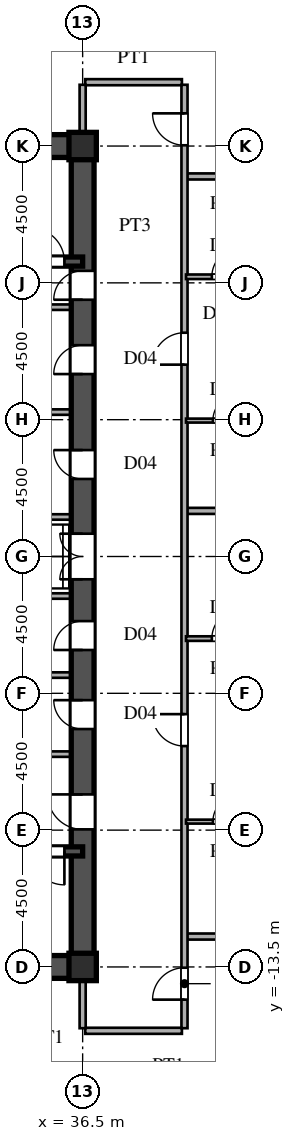
"""IFC4 building model, lengths in metres.
Left out: names, types, materials, properties, quantities, classifications, styles, units other than length and angle.
Written with IfcOpenShell. Run it as: python <this file> out.ifc"""

import sys

from ifc_helpers import new_model, si_unit, direction, frame, frame_2d, origin, origin_2d, place, context, subcontext, project, spatial, rectangle, i_section, extrude, source, transform, mapped, element, fill, save


model = new_model("IFC4")
c1 = context("Model", 3, precision=1e-05, world=origin(), true_north=direction((0.0, 1.0)))
c2 = subcontext(c1, "Body", "Model", "MODEL_VIEW")
j1 = project(units=[si_unit("LENGTHUNIT", "METRE"), si_unit("PLANEANGLEUNIT", "RADIAN")], contexts=[c1])
p1 = place(None, origin())
s1 = spatial("IfcSite", under=j1, at=p1, CompositionType="ELEMENT")
p2 = place(p1, origin())
s2 = spatial("IfcBuilding", under=s1, at=p2, CompositionType="ELEMENT")
p3 = place(p2, frame((0.0, 0.0, 47.7)))
s3 = spatial("IfcBuildingStorey", under=s2, at=p3, CompositionType="ELEMENT", Elevation=47.7)
m1 = source(origin(), c2, "Body", "SweptSolid", [
    extrude(i_section(OverallWidth=0.9, OverallDepth=0.9, WebThickness=0.036, FlangeThickness=0.055, at=origin_2d()), origin(), (0.0, 0.0, 1.0), 3.6),
])
for number, where, z_axis, x_axis in (
    (1, (36.5, -13.5, 0.0), (0.0, 0.0, 1.0), (1.0, 0.0, 0.0)),
    (2, (36.5, 13.5, 0.0), (0.0, 0.0, 1.0), (1.0, 0.0, 0.0)),
):
    element("IfcColumn", number, at=place(p3, frame(where, z_axis=z_axis, x_axis=x_axis)), inside=s3, PredefinedType="COLUMN", context=c2, shape_type="MappedRepresentation", body=[
        mapped(m1, transform((0.0, 0.0, 0.0), scale=1.0)),
    ])
for number, where, z_axis, x_axis in (
    (3, (27.5, -13.5, 0.0), (0.0, 0.0, 1.0), (1.0, 0.0, 0.0)),
    (4, (27.5, 13.5, 0.0), (0.0, 0.0, 1.0), (1.0, 0.0, 0.0)),
):
    element("IfcWall", number, at=place(p3, frame(where, z_axis=z_axis, x_axis=x_axis)), inside=s3, PredefinedType="SHEAR", context=c2, shape_type="SweptSolid", body=[
        extrude(rectangle(XDim=9.0, YDim=0.75, at=frame_2d((4.5, 0.0))), origin(), (0.0, 0.0, 1.0), 3.38),
    ])
p4 = place(p3, frame((36.5, -13.65, 0.0), z_axis=(0.0, 0.0, 1.0), x_axis=(0.0, 1.0, 0.0)))
e5 = element("IfcWall", 5, at=p4, inside=s3, PredefinedType="SHEAR", context=c2, shape_type="SweptSolid", body=[
    extrude(rectangle(XDim=7.15, YDim=0.75, at=frame_2d((3.575, 0.0))), origin(), (0.0, 0.0, 1.0), 3.38),
])
p5 = place(p4, frame((4.675, 0.0, 0.0)))
e6 = element("IfcOpeningElement", 6, at=p5, cuts=e5, PredefinedType="OPENING", context=c2, shape_type="SweptSolid", body=[
    extrude(rectangle(XDim=1.15, YDim=2.2, at=frame_2d((0.575, 1.1))), frame((0.0, 0.385, 0.0), z_axis=(0.0, -1.0, 0.0), x_axis=(1.0, 0.0, 0.0)), (0.0, 0.0, 1.0), 0.77),
])
p6 = place(p3, frame((36.5, -1.3, 0.0), z_axis=(0.0, 0.0, 1.0), x_axis=(0.0, 1.0, 0.0)))
e7 = element("IfcWall", 7, at=p6, inside=s3, PredefinedType="SHEAR", context=c2, shape_type="SweptSolid", body=[
    extrude(rectangle(XDim=2.6, YDim=0.75, at=frame_2d((1.3, 0.0))), origin(), (0.0, 0.0, 1.0), 3.38),
])
p7 = place(p6, frame((0.55, 0.0, 0.0)))
e8 = element("IfcOpeningElement", 8, at=p7, cuts=e7, PredefinedType="OPENING", context=c2, shape_type="SweptSolid", body=[
    extrude(rectangle(XDim=1.5, YDim=2.3, at=frame_2d((0.75, 1.15))), frame((0.0, 0.385, 0.0), z_axis=(0.0, -1.0, 0.0), x_axis=(1.0, 0.0, 0.0)), (0.0, 0.0, 1.0), 0.77),
])
p8 = place(p3, frame((36.5, 8.2, 0.0), z_axis=(0.0, 0.0, 1.0), x_axis=(0.0, 1.0, 0.0)))
e9 = element("IfcWall", 9, at=p8, inside=s3, PredefinedType="SHEAR", context=c2, shape_type="SweptSolid", body=[
    extrude(rectangle(XDim=5.45, YDim=0.75, at=frame_2d((2.725, 0.0))), origin(), (0.0, 0.0, 1.0), 3.38),
])
p9 = place(p8, frame((0.245, 0.0, 0.0)))
e10 = element("IfcOpeningElement", 10, at=p9, cuts=e9, PredefinedType="OPENING", context=c2, shape_type="SweptSolid", body=[
    extrude(rectangle(XDim=0.95, YDim=2.15, at=frame_2d((0.475, 1.075))), frame((0.0, 0.385, 0.0), z_axis=(0.0, -1.0, 0.0), x_axis=(1.0, 0.0, 0.0)), (0.0, 0.0, 1.0), 0.77),
])
p10 = place(p3, frame((36.5, -6.5, 0.0), z_axis=(0.0, 0.0, 1.0), x_axis=(0.0, 1.0, 0.0)))
e11 = element("IfcWall", 11, at=p10, inside=s3, PredefinedType="SHEAR", context=c2, shape_type="SweptSolid", body=[
    extrude(rectangle(XDim=2.6, YDim=0.75, at=frame_2d((1.3, 0.0))), origin(), (0.0, 0.0, 1.0), 3.38),
])
p11 = place(p10, frame((0.825, 0.0, 0.0)))
e12 = element("IfcOpeningElement", 12, at=p11, cuts=e11, PredefinedType="OPENING", context=c2, shape_type="SweptSolid", body=[
    extrude(rectangle(XDim=0.95, YDim=2.15, at=frame_2d((0.475, 1.075))), frame((0.0, 0.385, 0.0), z_axis=(0.0, -1.0, 0.0), x_axis=(1.0, 0.0, 0.0)), (0.0, 0.0, 1.0), 0.77),
])
p12 = place(p3, frame((36.5, -3.9, 0.0), z_axis=(0.0, 0.0, 1.0), x_axis=(0.0, 1.0, 0.0)))
e13 = element("IfcWall", 13, at=p12, inside=s3, PredefinedType="SHEAR", context=c2, shape_type="SweptSolid", body=[
    extrude(rectangle(XDim=2.6, YDim=0.75, at=frame_2d((1.3, 0.0))), origin(), (0.0, 0.0, 1.0), 3.38),
])
p13 = place(p12, frame((0.825, 0.0, 0.0)))
e14 = element("IfcOpeningElement", 14, at=p13, cuts=e13, PredefinedType="OPENING", context=c2, shape_type="SweptSolid", body=[
    extrude(rectangle(XDim=0.95, YDim=2.15, at=frame_2d((0.475, 1.075))), frame((0.0, 0.385, 0.0), z_axis=(0.0, -1.0, 0.0), x_axis=(1.0, 0.0, 0.0)), (0.0, 0.0, 1.0), 0.77),
])
p14 = place(p3, frame((36.5, 1.3, 0.0), z_axis=(0.0, 0.0, 1.0), x_axis=(0.0, 1.0, 0.0)))
e15 = element("IfcWall", 15, at=p14, inside=s3, PredefinedType="SHEAR", context=c2, shape_type="SweptSolid", body=[
    extrude(rectangle(XDim=3.45, YDim=0.75, at=frame_2d((1.725, 0.0))), origin(), (0.0, 0.0, 1.0), 3.38),
])
p15 = place(p14, frame((1.25, 0.0, 0.0)))
e16 = element("IfcOpeningElement", 16, at=p15, cuts=e15, PredefinedType="OPENING", context=c2, shape_type="SweptSolid", body=[
    extrude(rectangle(XDim=0.95, YDim=2.15, at=frame_2d((0.475, 1.075))), frame((0.0, 0.385, 0.0), z_axis=(0.0, -1.0, 0.0), x_axis=(1.0, 0.0, 0.0)), (0.0, 0.0, 1.0), 0.77),
])
p16 = place(p3, frame((36.5, 4.75, 0.0), z_axis=(0.0, 0.0, 1.0), x_axis=(0.0, 1.0, 0.0)))
e17 = element("IfcWall", 17, at=p16, inside=s3, PredefinedType="SHEAR", context=c2, shape_type="SweptSolid", body=[
    extrude(rectangle(XDim=3.45, YDim=0.75, at=frame_2d((1.725, 0.0))), origin(), (0.0, 0.0, 1.0), 3.38),
])
p17 = place(p16, frame((1.25, 0.0, 0.0)))
e18 = element("IfcOpeningElement", 18, at=p17, cuts=e17, PredefinedType="OPENING", context=c2, shape_type="SweptSolid", body=[
    extrude(rectangle(XDim=0.95, YDim=2.15, at=frame_2d((0.475, 1.075))), frame((0.0, 0.385, 0.0), z_axis=(0.0, -1.0, 0.0), x_axis=(1.0, 0.0, 0.0)), (0.0, 0.0, 1.0), 0.77),
])
p18 = place(p3, frame((27.5, -9.7, 0.0), z_axis=(0.0, 0.0, 1.0), x_axis=(1.0, 0.0, 0.0)))
e19 = element("IfcWall", 19, at=p18, inside=s3, PredefinedType="SHEAR", context=c2, shape_type="SweptSolid", body=[
    extrude(rectangle(XDim=9.0, YDim=0.3, at=frame_2d((4.5, 0.0))), origin(), (0.0, 0.0, 1.0), 3.38),
])
p19 = place(p18, frame((7.3, 0.0, 0.0)))
e20 = element("IfcOpeningElement", 20, at=p19, cuts=e19, PredefinedType="OPENING", context=c2, shape_type="SweptSolid", body=[
    extrude(rectangle(XDim=1.1, YDim=2.2, at=frame_2d((0.55, 1.1))), frame((0.0, 0.16, 0.0), z_axis=(0.0, -1.0, 0.0), x_axis=(1.0, 0.0, 0.0)), (0.0, 0.0, 1.0), 0.32),
])
p20 = place(p3, frame((27.5, 9.7, 0.0), z_axis=(0.0, 0.0, 1.0), x_axis=(1.0, 0.0, 0.0)))
e21 = element("IfcWall", 21, at=p20, inside=s3, PredefinedType="SHEAR", context=c2, shape_type="SweptSolid", body=[
    extrude(rectangle(XDim=9.0, YDim=0.3, at=frame_2d((4.5, 0.0))), origin(), (0.0, 0.0, 1.0), 3.38),
])
p21 = place(p20, frame((7.3, 0.0, 0.0)))
e22 = element("IfcOpeningElement", 22, at=p21, cuts=e21, PredefinedType="OPENING", context=c2, shape_type="SweptSolid", body=[
    extrude(rectangle(XDim=1.1, YDim=2.2, at=frame_2d((0.55, 1.1))), frame((0.0, 0.16, 0.0), z_axis=(0.0, -1.0, 0.0), x_axis=(1.0, 0.0, 0.0)), (0.0, 0.0, 1.0), 0.32),
])
for number, where, z_axis, x_axis in (
    (23, (30.45, -6.5, 0.0), (0.0, 0.0, 1.0), (1.0, 0.0, 0.0)),
    (24, (30.45, 8.2, 0.0), (0.0, 0.0, 1.0), (1.0, 0.0, 0.0)),
):
    element("IfcWall", number, at=place(p3, frame(where, z_axis=z_axis, x_axis=x_axis)), inside=s3, PredefinedType="PARTITIONING", context=c2, shape_type="SweptSolid", body=[
        extrude(rectangle(XDim=5.7, YDim=0.18, at=frame_2d((2.85, 0.0))), origin(), (0.0, 0.0, 1.0), 3.38),
    ])
for number, where, z_axis, x_axis in (
    (25, (33.2, -1.3, 0.0), (0.0, 0.0, 1.0), (1.0, 0.0, 0.0)),
    (26, (33.2, 1.3, 0.0), (0.0, 0.0, 1.0), (1.0, 0.0, 0.0)),
    (27, (33.2, -3.9, 0.0), (0.0, 0.0, 1.0), (1.0, 0.0, 0.0)),
    (28, (33.2, 4.75, 0.0), (0.0, 0.0, 1.0), (1.0, 0.0, 0.0)),
):
    element("IfcWall", number, at=place(p3, frame(where, z_axis=z_axis, x_axis=x_axis)), inside=s3, PredefinedType="PARTITIONING", context=c2, shape_type="SweptSolid", body=[
        extrude(rectangle(XDim=2.95, YDim=0.18, at=frame_2d((1.475, 0.0))), origin(), (0.0, 0.0, 1.0), 3.38),
    ])
p22 = place(p3, frame((36.585, -15.6, 0.0), z_axis=(0.0, 0.0, 1.0), x_axis=(1.0, 0.0, 0.0)))
e29 = element("IfcWall", 29, at=p22, inside=s3, PredefinedType="PARTITIONING", context=c2, shape_type="SweptSolid", body=[
    extrude(rectangle(XDim=3.18, YDim=0.2, at=frame_2d((1.59, 0.0))), origin(), (0.0, 0.0, 1.0), 3.38),
])
p23 = place(p3, frame((39.93, -12.5, 0.0), z_axis=(0.0, 0.0, 1.0), x_axis=(1.0, 0.0, 0.0)))
e30 = element("IfcWall", 30, at=p23, inside=s3, PredefinedType="PARTITIONING", context=c2, shape_type="SweptSolid", body=[
    extrude(rectangle(XDim=26.407, YDim=0.2, at=frame_2d((13.204, 0.0))), origin(), (0.0, 0.0, 1.0), 3.38),
])
p24 = place(p3, frame((39.9, -8.72, 0.0), z_axis=(0.0, 0.0, 1.0), x_axis=(1.0, 0.0, 0.0)))
e31 = element("IfcWall", 31, at=p24, inside=s3, PredefinedType="PARTITIONING", context=c2, shape_type="SweptSolid", body=[
    extrude(rectangle(XDim=2.65, YDim=0.13, at=frame_2d((1.325, 0.0))), origin(), (0.0, 0.0, 1.0), 3.38),
])
p25 = place(p24, frame((0.885, 0.0, 0.0)))
e32 = element("IfcOpeningElement", 32, at=p25, cuts=e31, PredefinedType="OPENING", context=c2, shape_type="SweptSolid", body=[
    extrude(rectangle(XDim=0.88, YDim=2.1, at=frame_2d((0.44, 1.05))), frame((0.0, 0.075, 0.0), z_axis=(0.0, -1.0, 0.0), x_axis=(1.0, 0.0, 0.0)), (0.0, 0.0, 1.0), 0.15),
])
p26 = place(p3, frame((39.9, -2.7, 0.0), z_axis=(0.0, 0.0, 1.0), x_axis=(1.0, 0.0, 0.0)))
e33 = element("IfcWall", 33, at=p26, inside=s3, PredefinedType="PARTITIONING", context=c2, shape_type="SweptSolid", body=[
    extrude(rectangle(XDim=2.65, YDim=0.15, at=frame_2d((1.325, 0.0))), origin(), (0.0, 0.0, 1.0), 3.38),
])
p27 = place(p26, frame((0.85, 0.0, 0.0)))
e34 = element("IfcOpeningElement", 34, at=p27, cuts=e33, PredefinedType="OPENING", context=c2, shape_type="SweptSolid", body=[
    extrude(rectangle(XDim=0.95, YDim=2.15, at=frame_2d((0.475, 1.075))), frame((0.0, 0.085, 0.0), z_axis=(0.0, -1.0, 0.0), x_axis=(1.0, 0.0, 0.0)), (0.0, 0.0, 1.0), 0.17),
])
p28 = place(p3, frame((39.93, 1.5, 0.0), z_axis=(0.0, 0.0, 1.0), x_axis=(1.0, 0.0, 0.0)))
e35 = element("IfcWall", 35, at=p28, inside=s3, PredefinedType="PARTITIONING", context=c2, shape_type="SweptSolid", body=[
    extrude(rectangle(XDim=32.575, YDim=0.2, at=frame_2d((16.288, 0.0))), origin(), (0.0, 0.0, 1.0), 3.38),
])
p29 = place(p3, frame((39.9, 4.47, 0.0), z_axis=(0.0, 0.0, 1.0), x_axis=(1.0, 0.0, 0.0)))
e36 = element("IfcWall", 36, at=p29, inside=s3, PredefinedType="PARTITIONING", context=c2, shape_type="SweptSolid", body=[
    extrude(rectangle(XDim=2.65, YDim=0.13, at=frame_2d((1.325, 0.0))), origin(), (0.0, 0.0, 1.0), 2.68),
])
p30 = place(p29, frame((0.885, 0.0, 0.0)))
e37 = element("IfcOpeningElement", 37, at=p30, cuts=e36, PredefinedType="OPENING", context=c2, shape_type="SweptSolid", body=[
    extrude(rectangle(XDim=0.88, YDim=2.1, at=frame_2d((0.44, 1.05))), frame((0.0, 0.075, 0.0), z_axis=(0.0, -1.0, 0.0), x_axis=(1.0, 0.0, 0.0)), (0.0, 0.0, 1.0), 0.15),
])
p31 = place(p3, frame((39.9, 9.2, 0.0), z_axis=(0.0, 0.0, 1.0), x_axis=(1.0, 0.0, 0.0)))
e38 = element("IfcWall", 38, at=p31, inside=s3, PredefinedType="PARTITIONING", context=c2, shape_type="SweptSolid", body=[
    extrude(rectangle(XDim=2.65, YDim=0.15, at=frame_2d((1.325, 0.0))), origin(), (0.0, 0.0, 1.0), 3.38),
])
p32 = place(p31, frame((0.85, 0.0, 0.0)))
e39 = element("IfcOpeningElement", 39, at=p32, cuts=e38, PredefinedType="OPENING", context=c2, shape_type="SweptSolid", body=[
    extrude(rectangle(XDim=0.95, YDim=2.15, at=frame_2d((0.475, 1.075))), frame((0.0, 0.085, 0.0), z_axis=(0.0, -1.0, 0.0), x_axis=(1.0, 0.0, 0.0)), (0.0, 0.0, 1.0), 0.17),
])
p33 = place(p3, frame((39.93, 12.5, 0.0), z_axis=(0.0, 0.0, 1.0), x_axis=(1.0, 0.0, 0.0)))
e40 = element("IfcWall", 40, at=p33, inside=s3, PredefinedType="PARTITIONING", context=c2, shape_type="SweptSolid", body=[
    extrude(rectangle(XDim=26.407, YDim=0.2, at=frame_2d((13.204, 0.0))), origin(), (0.0, 0.0, 1.0), 3.38),
])
p34 = place(p3, frame((36.585, 15.6, 0.0), z_axis=(0.0, 0.0, 1.0), x_axis=(1.0, 0.0, 0.0)))
e41 = element("IfcWall", 41, at=p34, inside=s3, PredefinedType="PARTITIONING", context=c2, shape_type="SweptSolid", body=[
    extrude(rectangle(XDim=3.18, YDim=0.2, at=frame_2d((1.59, 0.0))), origin(), (0.0, 0.0, 1.0), 3.38),
])
for number, where, z_axis, x_axis in (
    (42, (36.5, -15.515, 0.0), (0.0, 0.0, 1.0), (0.0, 1.0, 0.0)),
    (43, (36.5, 13.88, 0.0), (0.0, 0.0, 1.0), (0.0, 1.0, 0.0)),
):
    element("IfcWall", number, at=place(p3, frame(where, z_axis=z_axis, x_axis=x_axis)), inside=s3, PredefinedType="PARTITIONING", context=c2, shape_type="SweptSolid", body=[
        extrude(rectangle(XDim=1.635, YDim=0.2, at=frame_2d((0.817, 0.0))), origin(), (0.0, 0.0, 1.0), 2.68),
    ])
p35 = place(p3, frame((39.85, -15.515, 0.0), z_axis=(0.0, 0.0, 1.0), x_axis=(0.0, 1.0, 0.0)))
e44 = element("IfcWall", 44, at=p35, inside=s3, PredefinedType="PARTITIONING", context=c2, shape_type="SweptSolid", body=[
    extrude(rectangle(XDim=31.03, YDim=0.2, at=frame_2d((15.515, 0.0))), origin(), (0.0, 0.0, 1.0), 3.38),
])
p36 = place(p35, frame((0.94, 0.0, 0.0)))
e45 = element("IfcOpeningElement", 45, at=p36, cuts=e44, PredefinedType="OPENING", context=c2, shape_type="SweptSolid", body=[
    extrude(rectangle(XDim=1.05, YDim=2.25, at=frame_2d((0.525, 1.125))), frame((0.0, 0.11, 0.0), z_axis=(0.0, -1.0, 0.0), x_axis=(1.0, 0.0, 0.0)), (0.0, 0.0, 1.0), 0.22),
])
p37 = place(p35, frame((9.28, 0.0, 0.0)))
e46 = element("IfcOpeningElement", 46, at=p37, cuts=e44, PredefinedType="OPENING", context=c2, shape_type="SweptSolid", body=[
    extrude(rectangle(XDim=1.05, YDim=2.25, at=frame_2d((0.525, 1.125))), frame((0.0, 0.11, 0.0), z_axis=(0.0, -1.0, 0.0), x_axis=(1.0, 0.0, 0.0)), (0.0, 0.0, 1.0), 0.22),
])
p38 = place(p35, frame((21.825, 0.0, 0.0)))
e47 = element("IfcOpeningElement", 47, at=p38, cuts=e44, PredefinedType="OPENING", context=c2, shape_type="SweptSolid", body=[
    extrude(rectangle(XDim=1.05, YDim=2.25, at=frame_2d((0.525, 1.125))), frame((0.0, 0.11, 0.0), z_axis=(0.0, -1.0, 0.0), x_axis=(1.0, 0.0, 0.0)), (0.0, 0.0, 1.0), 0.22),
])
p39 = place(p35, frame((29.04, 0.0, 0.0)))
e48 = element("IfcOpeningElement", 48, at=p39, cuts=e44, PredefinedType="OPENING", context=c2, shape_type="SweptSolid", body=[
    extrude(rectangle(XDim=1.05, YDim=2.25, at=frame_2d((0.525, 1.125))), frame((0.0, 0.11, 0.0), z_axis=(0.0, -1.0, 0.0), x_axis=(1.0, 0.0, 0.0)), (0.0, 0.0, 1.0), 0.22),
])
m2 = source(origin(), c2, "Body", "SweptSolid", [
    extrude(rectangle(XDim=1.15, YDim=2.2, at=frame_2d((0.575, 1.1))), frame((0.0, 0.025, 0.0), z_axis=(0.0, -1.0, 0.0), x_axis=(1.0, 0.0, 0.0)), (0.0, 0.0, 1.0), 0.05),
])
p40 = place(p5, origin())
e49 = element("IfcDoor", 49, at=p40, inside=s3, OperationType="SINGLE_SWING_RIGHT", PredefinedType="DOOR", context=c2, shape_type="MappedRepresentation", body=[
    mapped(m2, transform((0.0, 0.0, 0.0), scale=1.0)),
])
fill(e6, e49)
m3 = source(origin(), c2, "Body", "SweptSolid", [
    extrude(rectangle(XDim=1.5, YDim=2.3, at=frame_2d((0.75, 1.15))), frame((0.0, 0.025, 0.0), z_axis=(0.0, -1.0, 0.0), x_axis=(1.0, 0.0, 0.0)), (0.0, 0.0, 1.0), 0.05),
])
p41 = place(p7, origin())
e50 = element("IfcDoor", 50, at=p41, inside=s3, OperationType="DOUBLE_SWING_LEFT", PredefinedType="DOOR", context=c2, shape_type="MappedRepresentation", body=[
    mapped(m3, transform((0.0, 0.0, 0.0), scale=1.0)),
])
fill(e8, e50)
m4 = source(origin(), c2, "Body", "SweptSolid", [
    extrude(rectangle(XDim=0.95, YDim=2.15, at=frame_2d((0.475, 1.075))), frame((0.0, 0.025, 0.0), z_axis=(0.0, -1.0, 0.0), x_axis=(1.0, 0.0, 0.0)), (0.0, 0.0, 1.0), 0.05),
])
p42 = place(p9, origin())
e51 = element("IfcDoor", 51, at=p42, inside=s3, OperationType="SINGLE_SWING_LEFT", PredefinedType="DOOR", context=c2, shape_type="MappedRepresentation", body=[
    mapped(m4, transform((0.0, 0.0, 0.0), scale=1.0)),
])
fill(e10, e51)
p43 = place(p11, origin())
e52 = element("IfcDoor", 52, at=p43, inside=s3, OperationType="SINGLE_SWING_RIGHT", PredefinedType="DOOR", context=c2, shape_type="MappedRepresentation", body=[
    mapped(m4, transform((0.0, 0.0, 0.0), scale=1.0)),
])
fill(e12, e52)
p44 = place(p13, origin())
e53 = element("IfcDoor", 53, at=p44, inside=s3, OperationType="SINGLE_SWING_LEFT", PredefinedType="DOOR", context=c2, shape_type="MappedRepresentation", body=[
    mapped(m4, transform((0.0, 0.0, 0.0), scale=1.0)),
])
fill(e14, e53)
p45 = place(p15, origin())
e54 = element("IfcDoor", 54, at=p45, inside=s3, OperationType="SINGLE_SWING_RIGHT", PredefinedType="DOOR", context=c2, shape_type="MappedRepresentation", body=[
    mapped(m4, transform((0.0, 0.0, 0.0), scale=1.0)),
])
fill(e16, e54)
p46 = place(p17, origin())
e55 = element("IfcDoor", 55, at=p46, inside=s3, OperationType="SINGLE_SWING_LEFT", PredefinedType="DOOR", context=c2, shape_type="MappedRepresentation", body=[
    mapped(m4, transform((0.0, 0.0, 0.0), scale=1.0)),
])
fill(e18, e55)
m5 = source(origin(), c2, "Body", "SweptSolid", [
    extrude(rectangle(XDim=1.1, YDim=2.2, at=frame_2d((0.55, 1.1))), frame((0.0, 0.025, 0.0), z_axis=(0.0, -1.0, 0.0), x_axis=(1.0, 0.0, 0.0)), (0.0, 0.0, 1.0), 0.05),
])
p47 = place(p19, frame((1.1, 0.0, 0.0), z_axis=(0.0, 0.0, 1.0), x_axis=(-1.0, 0.0, 0.0)))
e56 = element("IfcDoor", 56, at=p47, inside=s3, OperationType="SINGLE_SWING_RIGHT", PredefinedType="DOOR", context=c2, shape_type="MappedRepresentation", body=[
    mapped(m5, transform((0.0, 0.0, 0.0), scale=1.0)),
])
fill(e20, e56)
p48 = place(p21, origin())
e57 = element("IfcDoor", 57, at=p48, inside=s3, OperationType="SINGLE_SWING_LEFT", PredefinedType="DOOR", context=c2, shape_type="MappedRepresentation", body=[
    mapped(m5, transform((0.0, 0.0, 0.0), scale=1.0)),
])
fill(e22, e57)
m6 = source(origin(), c2, "Body", "SweptSolid", [
    extrude(rectangle(XDim=0.88, YDim=2.1, at=frame_2d((0.44, 1.05))), frame((0.0, 0.025, 0.0), z_axis=(0.0, -1.0, 0.0), x_axis=(1.0, 0.0, 0.0)), (0.0, 0.0, 1.0), 0.05),
])
p49 = place(p25, origin())
e58 = element("IfcDoor", 58, at=p49, inside=s3, OperationType="SINGLE_SWING_RIGHT", PredefinedType="DOOR", context=c2, shape_type="MappedRepresentation", body=[
    mapped(m6, transform((0.0, 0.0, 0.0), scale=1.0)),
])
fill(e32, e58)
m7 = source(origin(), c2, "Body", "SweptSolid", [
    extrude(rectangle(XDim=0.95, YDim=2.15, at=frame_2d((0.475, 1.075))), frame((0.0, 0.025, 0.0), z_axis=(0.0, -1.0, 0.0), x_axis=(1.0, 0.0, 0.0)), (0.0, 0.0, 1.0), 0.05),
])
p50 = place(p27, origin())
e59 = element("IfcDoor", 59, at=p50, inside=s3, OperationType="SINGLE_SWING_RIGHT", PredefinedType="DOOR", context=c2, shape_type="MappedRepresentation", body=[
    mapped(m7, transform((0.0, 0.0, 0.0), scale=1.0)),
])
fill(e34, e59)
p51 = place(p30, origin())
e60 = element("IfcDoor", 60, at=p51, inside=s3, OperationType="SINGLE_SWING_RIGHT", PredefinedType="DOOR", context=c2, shape_type="MappedRepresentation", body=[
    mapped(m6, transform((0.0, 0.0, 0.0), scale=1.0)),
])
fill(e37, e60)
p52 = place(p32, origin())
e61 = element("IfcDoor", 61, at=p52, inside=s3, OperationType="SINGLE_SWING_RIGHT", PredefinedType="DOOR", context=c2, shape_type="MappedRepresentation", body=[
    mapped(m7, transform((0.0, 0.0, 0.0), scale=1.0)),
])
fill(e39, e61)
m8 = source(origin(), c2, "Body", "SweptSolid", [
    extrude(rectangle(XDim=1.05, YDim=2.25, at=frame_2d((0.525, 1.125))), frame((0.0, 0.025, 0.0), z_axis=(0.0, -1.0, 0.0), x_axis=(1.0, 0.0, 0.0)), (0.0, 0.0, 1.0), 0.05),
])
p53 = place(p36, origin())
e62 = element("IfcDoor", 62, at=p53, inside=s3, OperationType="SINGLE_SWING_LEFT", PredefinedType="DOOR", context=c2, shape_type="MappedRepresentation", body=[
    mapped(m8, transform((0.0, 0.0, 0.0), scale=1.0)),
])
fill(e45, e62)
p54 = place(p37, origin())
e63 = element("IfcDoor", 63, at=p54, inside=s3, OperationType="SINGLE_SWING_RIGHT", PredefinedType="DOOR", context=c2, shape_type="MappedRepresentation", body=[
    mapped(m8, transform((0.0, 0.0, 0.0), scale=1.0)),
])
fill(e46, e63)
p55 = place(p38, origin())
e64 = element("IfcDoor", 64, at=p55, inside=s3, OperationType="SINGLE_SWING_LEFT", PredefinedType="DOOR", context=c2, shape_type="MappedRepresentation", body=[
    mapped(m8, transform((0.0, 0.0, 0.0), scale=1.0)),
])
fill(e47, e64)
p56 = place(p39, origin())
e65 = element("IfcDoor", 65, at=p56, inside=s3, OperationType="SINGLE_SWING_RIGHT", PredefinedType="DOOR", context=c2, shape_type="MappedRepresentation", body=[
    mapped(m8, transform((0.0, 0.0, 0.0), scale=1.0)),
])
fill(e48, e65)
save(model, sys.argv[1])
